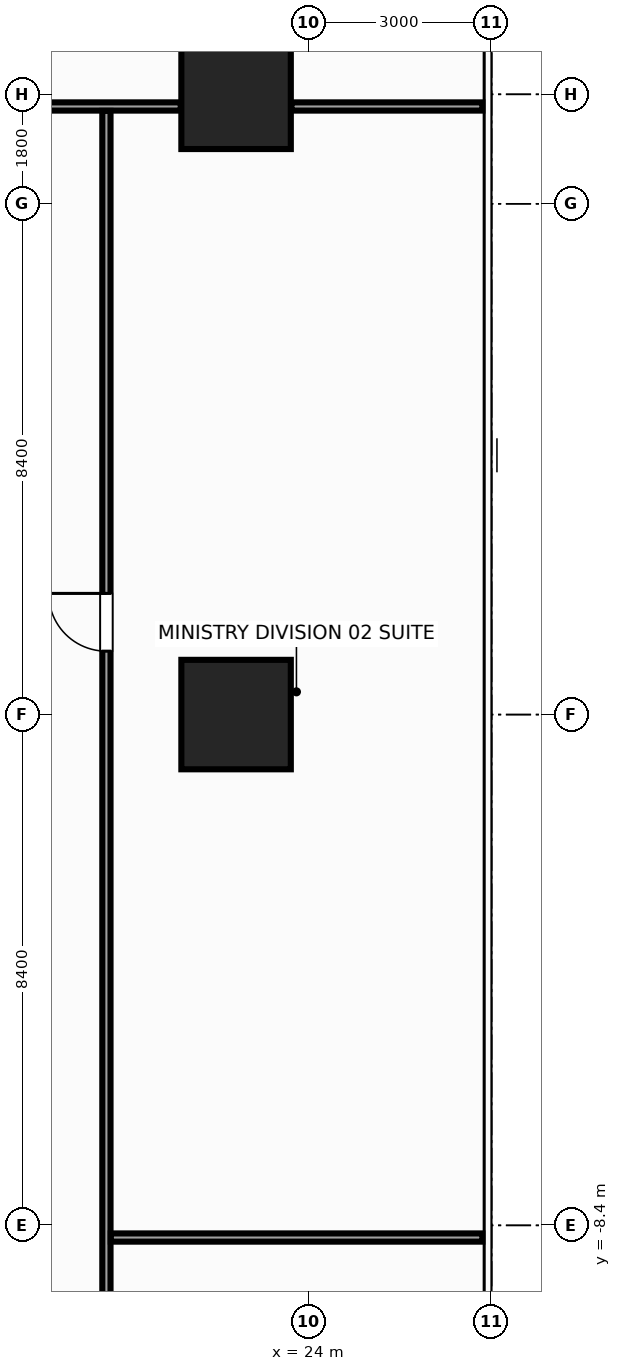
"""IFC4 building model, lengths in metres.
Left out: names, types, materials, properties, quantities, classifications, styles, units other than length and angle.
Written with IfcOpenShell. Run it as: python <this file> out.ifc"""

import sys

from ifc_helpers import new_model, si_unit, direction, frame, frame_2d, origin, origin_2d, place, context, subcontext, project, spatial, rectangle, extrude, source, transform, mapped, element, fill, save


model = new_model("IFC4")
c1 = context("Model", 3, precision=1e-05, world=origin(), true_north=direction((0.0, 1.0)))
c2 = subcontext(c1, "Body", "Model", "MODEL_VIEW")
j1 = project(units=[si_unit("LENGTHUNIT", "METRE"), si_unit("PLANEANGLEUNIT", "RADIAN")], contexts=[c1])
p1 = place(None, origin())
s1 = spatial("IfcSite", under=j1, at=p1, CompositionType="ELEMENT")
p2 = place(p1, origin())
s2 = spatial("IfcBuilding", under=s1, at=p2, CompositionType="ELEMENT")
p3 = place(p2, frame((0.0, 0.0, 38.0)))
s3 = spatial("IfcBuildingStorey", under=s2, at=p3, CompositionType="ELEMENT", Elevation=38.0)
m1 = source(origin(), c2, "Body", "SweptSolid", [
    extrude(rectangle(XDim=1.8, YDim=1.8, at=origin_2d()), origin(), (0.0, 0.0, 1.0), 3.6),
])
for number, where, z_axis, x_axis in (
    (1, (22.8, 0.0, 0.0), (0.0, 0.0, 1.0), (1.0, 0.0, 0.0)),
    (2, (22.8, 10.2, 0.0), (0.0, 0.0, 1.0), (1.0, 0.0, 0.0)),
):
    element("IfcColumn", number, at=place(p3, frame(where, z_axis=z_axis, x_axis=x_axis)), inside=s3, PredefinedType="COLUMN", context=c2, shape_type="MappedRepresentation", body=[
        mapped(m1, transform((0.0, 0.0, 0.0), x_axis=(1.0, 0.0, 0.0), y_axis=(0.0, 1.0, 0.0), z_axis=(0.0, 0.0, 1.0), scale=1.0)),
    ])
m2 = source(origin(), c2, "Body", "SweptSolid", [
    extrude(rectangle(XDim=4.18, YDim=0.135, at=frame_2d((2.09, 0.0))), origin(), (0.0, 0.0, 1.0), 2.745),
])
p4 = place(p3, frame((17.71, 10.0, 0.0), z_axis=(0.0, 0.0, 1.0), x_axis=(1.0, 0.0, 0.0)))
e3 = element("IfcWall", 3, at=p4, inside=s3, PredefinedType="PARTITIONING", context=c2, shape_type="MappedRepresentation", body=[
    mapped(m2, transform((0.0, 0.0, 0.0), x_axis=(1.0, 0.0, 0.0), y_axis=(0.0, 1.0, 0.0), z_axis=(0.0, 0.0, 1.0), scale=1.0)),
])
m3 = source(origin(), c2, "Body", "SweptSolid", [
    extrude(rectangle(XDim=3.14, YDim=0.135, at=frame_2d((1.57, 0.0))), origin(), (0.0, 0.0, 1.0), 2.435),
])
p5 = place(p3, frame((23.71, 10.0, 0.0), z_axis=(0.0, 0.0, 1.0), x_axis=(1.0, 0.0, 0.0)))
e4 = element("IfcWall", 4, at=p5, inside=s3, PredefinedType="PARTITIONING", context=c2, shape_type="MappedRepresentation", body=[
    mapped(m3, transform((0.0, 0.0, 0.0), x_axis=(1.0, 0.0, 0.0), y_axis=(0.0, 1.0, 0.0), z_axis=(0.0, 0.0, 1.0), scale=1.0)),
])
m4 = source(origin(), c2, "Body", "SweptSolid", [
    extrude(rectangle(XDim=24.123, YDim=0.135, at=frame_2d((12.061, 0.0))), origin(), (0.0, 0.0, 1.0), 2.745),
])
p6 = place(p3, frame((20.667, -14.195, 0.0), z_axis=(0.0, 0.0, 1.0), x_axis=(0.0, 1.0, 0.0)))
e5 = element("IfcWall", 5, at=p6, inside=s3, PredefinedType="PARTITIONING", context=c2, shape_type="MappedRepresentation", body=[
    mapped(m4, transform((0.0, 0.0, 0.0), x_axis=(1.0, 0.0, 0.0), y_axis=(0.0, 1.0, 0.0), z_axis=(0.0, 0.0, 1.0), scale=1.0)),
])
p7 = place(p6, frame((15.238, 0.0, 0.0)))
e6 = element("IfcOpeningElement", 6, at=p7, cuts=e5, PredefinedType="OPENING", context=c2, shape_type="SweptSolid", body=[
    extrude(rectangle(XDim=0.95, YDim=2.15, at=frame_2d((0.475, 1.075))), frame((0.0, 0.08, 0.0), z_axis=(0.0, -1.0, 0.0), x_axis=(1.0, 0.0, 0.0)), (0.0, 0.0, 1.0), 0.159),
])
p8 = place(p6, frame((1.249, 0.0, 0.0)))
e7 = element("IfcOpeningElement", 7, at=p8, cuts=e5, PredefinedType="OPENING", context=c2, shape_type="SweptSolid", body=[
    extrude(rectangle(XDim=0.95, YDim=2.15, at=frame_2d((0.475, 1.075))), frame((0.0, 0.08, 0.0), z_axis=(0.0, -1.0, 0.0), x_axis=(1.0, 0.0, 0.0)), (0.0, 0.0, 1.0), 0.159),
])
m5 = source(origin(), c2, "Body", "SweptSolid", [
    extrude(rectangle(XDim=6.11, YDim=0.135, at=frame_2d((3.055, 0.0))), origin(), (0.0, 0.0, 1.0), 2.745),
])
p9 = place(p3, frame((20.74, -8.6, 0.0), z_axis=(0.0, 0.0, 1.0), x_axis=(1.0, 0.0, 0.0)))
e8 = element("IfcWall", 8, at=p9, inside=s3, PredefinedType="PARTITIONING", context=c2, shape_type="MappedRepresentation", body=[
    mapped(m5, transform((0.0, 0.0, 0.0), x_axis=(1.0, 0.0, 0.0), y_axis=(0.0, 1.0, 0.0), z_axis=(0.0, 0.0, 1.0), scale=1.0)),
])
m6 = source(origin(), c2, "Body", "SweptSolid", [
    extrude(rectangle(XDim=0.95, YDim=2.15, at=frame_2d((0.475, 1.075))), frame((0.0, 0.025, 0.0), z_axis=(0.0, -1.0, 0.0), x_axis=(1.0, 0.0, 0.0)), (0.0, 0.0, 1.0), 0.05),
])
p10 = place(p7, origin())
e9 = element("IfcDoor", 9, at=p10, inside=s3, OperationType="SINGLE_SWING_RIGHT", PredefinedType="DOOR", context=c2, shape_type="MappedRepresentation", body=[
    mapped(m6, transform((0.0, 0.0, 0.0), x_axis=(1.0, 0.0, 0.0), y_axis=(0.0, 1.0, 0.0), z_axis=(0.0, 0.0, 1.0), scale=1.0)),
])
fill(e6, e9)
save(model, sys.argv[1])
